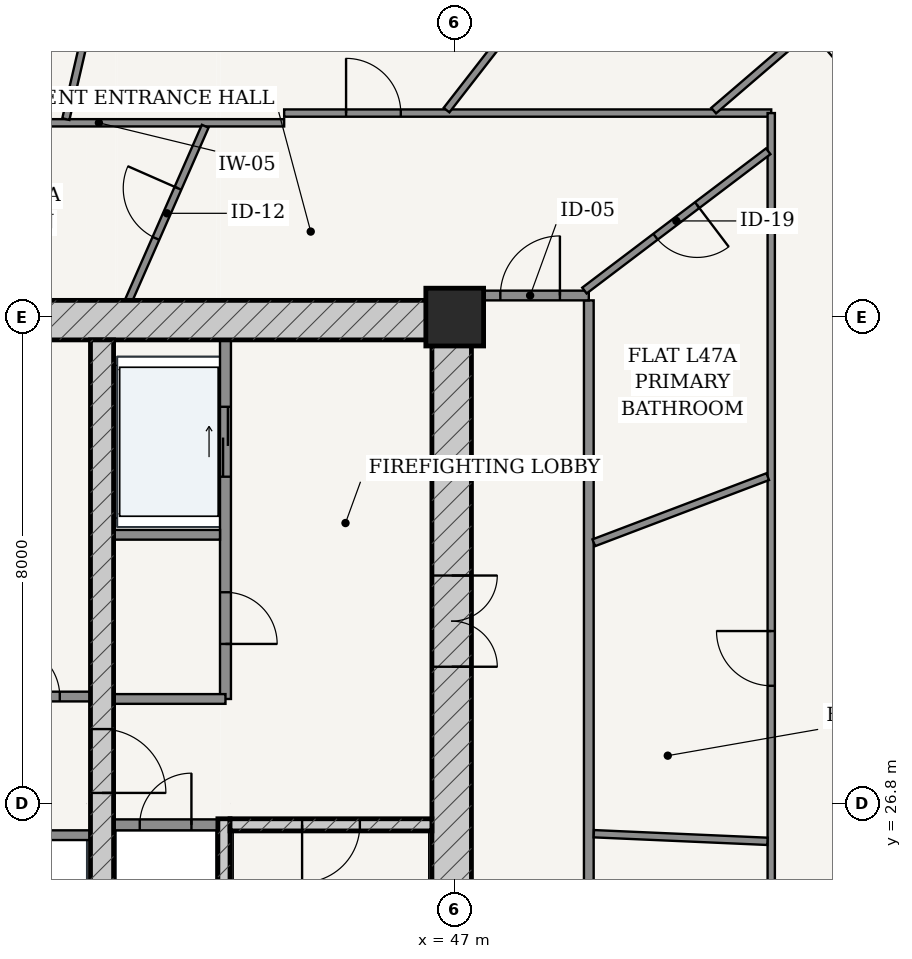
"""IFC4 building model, lengths in metres.
Left out: names, types, materials, properties, quantities, classifications, styles, units other than length and angle.
Written with IfcOpenShell. Run it as: python <this file> out.ifc"""

import sys

from ifc_helpers import new_model, si_unit, direction, frame, frame_2d, origin, origin_2d, place, context, subcontext, project, spatial, rectangle, extrude, source, transform, mapped, element, fill, save


model = new_model("IFC4")
c1 = context("Model", 3, precision=1e-05, world=origin(), true_north=direction((-0.2419218956, 0.970295726276)))
c2 = subcontext(c1, "Body", "Model", "MODEL_VIEW")
j1 = project(units=[si_unit("LENGTHUNIT", "METRE"), si_unit("PLANEANGLEUNIT", "RADIAN")], contexts=[c1])
p1 = place(None, origin())
s1 = spatial("IfcSite", under=j1, at=p1, CompositionType="ELEMENT")
p2 = place(p1, origin())
s2 = spatial("IfcBuilding", under=s1, at=p2, CompositionType="ELEMENT")
p3 = place(p2, frame((0.0, 0.0, 178.6)))
s3 = spatial("IfcBuildingStorey", under=s2, at=p3, CompositionType="ELEMENT", Elevation=178.6)
p4 = place(p3, frame((47.0, 34.8, 0.0), z_axis=(0.0, 0.0, 1.0), x_axis=(1.0, 0.0, 0.0)))
e1 = element("IfcColumn", 1, at=p4, inside=s3, PredefinedType="COLUMN", context=c2, shape_type="SweptSolid", body=[
    extrude(rectangle(XDim=0.95, YDim=0.95, at=origin_2d()), origin(), (0.0, 0.0, 1.0), 3.6),
])
p5 = place(p3, frame((28.725, 34.75, 0.0), z_axis=(0.0, 0.0, 1.0), x_axis=(1.0, 0.0, 0.0)))
e2 = element("IfcWall", 2, at=p5, inside=s3, PredefinedType="SHEAR", context=c2, shape_type="SweptSolid", body=[
    extrude(rectangle(XDim=18.55, YDim=0.65, at=frame_2d((9.275, 0.0))), origin(), (0.0, 0.0, 1.0), 3.33),
])
p6 = place(p3, frame((46.95, 19.175, 0.0), z_axis=(0.0, 0.0, 1.0), x_axis=(0.0, 1.0, 0.0)))
e3 = element("IfcWall", 3, at=p6, inside=s3, PredefinedType="SHEAR", context=c2, shape_type="SweptSolid", body=[
    extrude(rectangle(XDim=15.25, YDim=0.65, at=frame_2d((7.625, 0.0))), origin(), (0.0, 0.0, 1.0), 3.33),
])
p7 = place(p6, frame((9.875, 0.0, 0.0)))
e4 = element("IfcOpeningElement", 4, at=p7, cuts=e3, PredefinedType="OPENING", context=c2, shape_type="SweptSolid", body=[
    extrude(rectangle(XDim=1.5, YDim=2.2, at=frame_2d((0.75, 1.1))), frame((0.0, 0.335, 0.0), z_axis=(0.0, -1.0, 0.0), x_axis=(1.0, 0.0, 0.0)), (0.0, 0.0, 1.0), 0.67),
])
p8 = place(p3, frame((43.205, 19.175, 0.0), z_axis=(0.0, 0.0, 1.0), x_axis=(0.0, 1.0, 0.0)))
e5 = element("IfcWall", 5, at=p8, inside=s3, PredefinedType="SOLIDWALL", context=c2, shape_type="SweptSolid", body=[
    extrude(rectangle(XDim=7.375, YDim=0.2, at=frame_2d((3.688, 0.0))), origin(), (0.0, 0.0, 1.0), 3.33),
])
p9 = place(p3, frame((43.305, 26.45, 0.0), z_axis=(0.0, 0.0, 1.0), x_axis=(1.0, 0.0, 0.0)))
e6 = element("IfcWall", 6, at=p9, inside=s3, PredefinedType="SOLIDWALL", context=c2, shape_type="SweptSolid", body=[
    extrude(rectangle(XDim=3.32, YDim=0.2, at=frame_2d((1.66, 0.0))), origin(), (0.0, 0.0, 1.0), 3.33),
])
p10 = place(p9, frame((1.185, 0.0, 0.0)))
e7 = element("IfcOpeningElement", 7, at=p10, cuts=e6, PredefinedType="OPENING", context=c2, shape_type="SweptSolid", body=[
    extrude(rectangle(XDim=0.95, YDim=2.15, at=frame_2d((0.475, 1.075))), frame((0.0, 0.11, 0.0), z_axis=(0.0, -1.0, 0.0), x_axis=(1.0, 0.0, 0.0)), (0.0, 0.0, 1.0), 0.22),
])
p11 = place(p3, frame((41.2, 19.175, 0.0), z_axis=(0.0, 0.0, 1.0), x_axis=(0.0, 1.0, 0.0)))
e8 = element("IfcWall", 8, at=p11, inside=s3, PredefinedType="SHEAR", context=c2, shape_type="SweptSolid", body=[
    extrude(rectangle(XDim=15.25, YDim=0.38, at=frame_2d((7.625, 0.0))), origin(), (0.0, 0.0, 1.0), 3.33),
])
p12 = place(p11, frame((7.8, 0.0, 0.0)))
e9 = element("IfcOpeningElement", 9, at=p12, cuts=e8, PredefinedType="OPENING", context=c2, shape_type="SweptSolid", body=[
    extrude(rectangle(XDim=1.05, YDim=2.15, at=frame_2d((0.525, 1.075))), frame((0.0, 0.2, 0.0), z_axis=(0.0, -1.0, 0.0), x_axis=(1.0, 0.0, 0.0)), (0.0, 0.0, 1.0), 0.4),
])
p13 = place(p3, frame((41.39, 26.45, 0.0), z_axis=(0.0, 0.0, 1.0), x_axis=(1.0, 0.0, 0.0)))
e10 = element("IfcWall", 10, at=p13, inside=s3, PredefinedType="PARTITIONING", context=c2, shape_type="SweptSolid", body=[
    extrude(rectangle(XDim=1.71, YDim=0.18, at=frame_2d((0.855, 0.0))), origin(), (0.0, 0.0, 1.0), 3.33),
])
p14 = place(p13, frame((0.43, 0.0, 0.0)))
e11 = element("IfcOpeningElement", 11, at=p14, cuts=e10, PredefinedType="OPENING", context=c2, shape_type="SweptSolid", body=[
    extrude(rectangle(XDim=0.85, YDim=2.1, at=frame_2d((0.425, 1.05))), frame((0.0, 0.1, 0.0), z_axis=(0.0, -1.0, 0.0), x_axis=(1.0, 0.0, 0.0)), (0.0, 0.0, 1.0), 0.2),
])
p15 = place(p3, frame((43.23, 28.52, 0.0), z_axis=(0.0, 0.0, 1.0), x_axis=(0.0, 1.0, 0.0)))
e12 = element("IfcWall", 12, at=p15, inside=s3, PredefinedType="PARTITIONING", context=c2, shape_type="SweptSolid", body=[
    extrude(rectangle(XDim=5.905, YDim=0.18, at=frame_2d((2.953, 0.0))), origin(), (0.0, 0.0, 1.0), 3.33),
])
p16 = place(p15, frame((0.905, 0.0, 0.0)))
e13 = element("IfcOpeningElement", 13, at=p16, cuts=e12, PredefinedType="OPENING", context=c2, shape_type="SweptSolid", body=[
    extrude(rectangle(XDim=0.85, YDim=2.1, at=frame_2d((0.425, 1.05))), frame((0.0, 0.1, 0.0), z_axis=(0.0, -1.0, 0.0), x_axis=(1.0, 0.0, 0.0)), (0.0, 0.0, 1.0), 0.2),
])
p17 = place(p15, frame((3.655, 0.0, 0.0)))
e14 = element("IfcOpeningElement", 14, at=p17, cuts=e12, PredefinedType="OPENING", context=c2, shape_type="SweptSolid", body=[
    extrude(rectangle(XDim=1.15, YDim=2.2, at=frame_2d((0.575, 1.1))), frame((0.0, 0.1, 0.0), z_axis=(0.0, -1.0, 0.0), x_axis=(1.0, 0.0, 0.0)), (0.0, 0.0, 1.0), 0.2),
])
p18 = place(p3, frame((41.39, 31.22, 0.0), z_axis=(0.0, 0.0, 1.0), x_axis=(1.0, 0.0, 0.0)))
e15 = element("IfcWall", 15, at=p18, inside=s3, PredefinedType="PARTITIONING", context=c2, shape_type="SweptSolid", body=[
    extrude(rectangle(XDim=1.75, YDim=0.16, at=frame_2d((0.875, 0.0))), origin(), (0.0, 0.0, 1.0), 3.33),
])
p19 = place(p3, frame((41.39, 28.52, 0.0), z_axis=(0.0, 0.0, 1.0), x_axis=(1.0, 0.0, 0.0)))
e16 = element("IfcWall", 16, at=p19, inside=s3, PredefinedType="PARTITIONING", context=c2, shape_type="SweptSolid", body=[
    extrude(rectangle(XDim=1.84, YDim=0.16, at=frame_2d((0.92, 0.0))), origin(), (0.0, 0.0, 1.0), 3.33),
])
p20 = place(p3, frame((34.99, 28.56, 0.0), z_axis=(0.0, 0.0, 1.0), x_axis=(1.0, 0.0, 0.0)))
e17 = element("IfcWall", 17, at=p20, inside=s3, PredefinedType="PARTITIONING", context=c2, shape_type="SweptSolid", body=[
    extrude(rectangle(XDim=6.02, YDim=0.16, at=frame_2d((3.01, 0.0))), origin(), (0.0, 0.0, 1.0), 3.33),
])
p21 = place(p20, frame((0.505, 0.0, 0.0)))
e18 = element("IfcOpeningElement", 18, at=p21, cuts=e17, PredefinedType="OPENING", context=c2, shape_type="SweptSolid", body=[
    extrude(rectangle(XDim=0.85, YDim=2.1, at=frame_2d((0.425, 1.05))), frame((0.0, 0.09, 0.0), z_axis=(0.0, -1.0, 0.0), x_axis=(1.0, 0.0, 0.0)), (0.0, 0.0, 1.0), 0.18),
])
p22 = place(p20, frame((2.58, 0.0, 0.0)))
e19 = element("IfcOpeningElement", 19, at=p22, cuts=e17, PredefinedType="OPENING", context=c2, shape_type="SweptSolid", body=[
    extrude(rectangle(XDim=0.86, YDim=2.1, at=frame_2d((0.43, 1.05))), frame((0.0, 0.09, 0.0), z_axis=(0.0, -1.0, 0.0), x_axis=(1.0, 0.0, 0.0)), (0.0, 0.0, 1.0), 0.18),
])
p23 = place(p20, frame((4.665, 0.0, 0.0)))
e20 = element("IfcOpeningElement", 20, at=p23, cuts=e17, PredefinedType="OPENING", context=c2, shape_type="SweptSolid", body=[
    extrude(rectangle(XDim=0.85, YDim=2.1, at=frame_2d((0.425, 1.05))), frame((0.0, 0.09, 0.0), z_axis=(0.0, -1.0, 0.0), x_axis=(1.0, 0.0, 0.0)), (0.0, 0.0, 1.0), 0.18),
])
p24 = place(p3, frame((34.99, 26.28, 0.0), z_axis=(0.0, 0.0, 1.0), x_axis=(1.0, 0.0, 0.0)))
e21 = element("IfcWall", 21, at=p24, inside=s3, PredefinedType="PARTITIONING", context=c2, shape_type="SweptSolid", body=[
    extrude(rectangle(XDim=6.02, YDim=0.16, at=frame_2d((3.01, 0.0))), origin(), (0.0, 0.0, 1.0), 3.33),
])
p25 = place(p24, frame((0.225, 0.0, 0.0)))
e22 = element("IfcOpeningElement", 22, at=p25, cuts=e21, PredefinedType="OPENING", context=c2, shape_type="SweptSolid", body=[
    extrude(rectangle(XDim=1.1, YDim=2.2, at=frame_2d((0.55, 1.1))), frame((0.0, 0.09, 0.0), z_axis=(0.0, -1.0, 0.0), x_axis=(1.0, 0.0, 0.0)), (0.0, 0.0, 1.0), 0.18),
])
p26 = place(p24, frame((1.705, 0.0, 0.0)))
e23 = element("IfcOpeningElement", 23, at=p26, cuts=e21, PredefinedType="OPENING", context=c2, shape_type="SweptSolid", body=[
    extrude(rectangle(XDim=1.1, YDim=2.2, at=frame_2d((0.55, 1.1))), frame((0.0, 0.09, 0.0), z_axis=(0.0, -1.0, 0.0), x_axis=(1.0, 0.0, 0.0)), (0.0, 0.0, 1.0), 0.18),
])
p27 = place(p3, frame((49.205, 16.675, 0.0), z_axis=(0.0, 0.0, 1.0), x_axis=(0.0, 1.0, 0.0)))
e24 = element("IfcWall", 24, at=p27, inside=s3, PredefinedType="PARTITIONING", context=c2, shape_type="SweptSolid", body=[
    extrude(rectangle(XDim=18.4, YDim=0.16, at=frame_2d((9.2, 0.0))), origin(), (0.0, 0.0, 1.0), 2.776),
])
p28 = place(p3, frame((47.275, 35.155, 0.0), z_axis=(0.0, 0.0, 1.0), x_axis=(1.0, 0.0, 0.0)))
e25 = element("IfcWall", 25, at=p28, inside=s3, PredefinedType="PARTITIONING", context=c2, shape_type="SweptSolid", body=[
    extrude(rectangle(XDim=1.93, YDim=0.16, at=frame_2d((0.965, 0.0))), origin(), (0.0, 0.0, 1.0), 2.776),
])
p29 = place(p28, frame((0.475, 0.0, 0.0)))
e26 = element("IfcOpeningElement", 26, at=p29, cuts=e25, PredefinedType="OPENING", context=c2, shape_type="SweptSolid", body=[
    extrude(rectangle(XDim=0.98, YDim=2.2, at=frame_2d((0.49, 1.1))), frame((0.0, 0.09, 0.0), z_axis=(0.0, -1.0, 0.0), x_axis=(1.0, 0.0, 0.0)), (0.0, 0.0, 1.0), 0.18),
])
p30 = place(p3, frame((38.102, 37.995, 0.0), z_axis=(0.0, 0.0, 1.0), x_axis=(1.0, 0.0, 0.0)))
e27 = element("IfcWall", 27, at=p30, inside=s3, PredefinedType="PARTITIONING", context=c2, shape_type="SweptSolid", body=[
    extrude(rectangle(XDim=6.093, YDim=0.12, at=frame_2d((3.046, 0.0))), origin(), (0.0, 0.0, 1.0), 2.776),
])
p31 = place(p3, frame((44.195, 38.155, 0.0), z_axis=(0.0, 0.0, 1.0), x_axis=(1.0, 0.0, 0.0)))
e28 = element("IfcWall", 28, at=p31, inside=s3, PredefinedType="PARTITIONING", context=c2, shape_type="SweptSolid", body=[
    extrude(rectangle(XDim=8.01, YDim=0.12, at=frame_2d((4.005, 0.0))), origin(), (0.0, 0.0, 1.0), 2.776),
])
p32 = place(p31, frame((1.018, 0.0, 0.0)))
e29 = element("IfcOpeningElement", 29, at=p32, cuts=e28, PredefinedType="OPENING", context=c2, shape_type="SweptSolid", body=[
    extrude(rectangle(XDim=0.9, YDim=2.15, at=frame_2d((0.45, 1.075))), frame((0.0, 0.07, 0.0), z_axis=(0.0, -1.0, 0.0), x_axis=(1.0, 0.0, 0.0)), (0.0, 0.0, 1.0), 0.14),
])
p33 = place(p3, frame((52.205, 38.155, 0.0), z_axis=(0.0, 0.0, 1.0), x_axis=(0.0, -1.0, 0.0)))
e30 = element("IfcWall", 30, at=p33, inside=s3, PredefinedType="PARTITIONING", context=c2, shape_type="SweptSolid", body=[
    extrude(rectangle(XDim=16.31, YDim=0.12, at=frame_2d((8.155, 0.0))), origin(), (0.0, 0.0, 1.0), 2.776),
])
p34 = place(p33, frame((13.574, 0.0, 0.0)))
e31 = element("IfcOpeningElement", 31, at=p34, cuts=e30, PredefinedType="OPENING", context=c2, shape_type="SweptSolid", body=[
    extrude(rectangle(XDim=0.9, YDim=2.15, at=frame_2d((0.45, 1.075))), frame((0.0, 0.07, 0.0), z_axis=(0.0, -1.0, 0.0), x_axis=(1.0, 0.0, 0.0)), (0.0, 0.0, 1.0), 0.14),
])
p35 = place(p33, frame((8.518, 0.0, 0.0)))
e32 = element("IfcOpeningElement", 32, at=p35, cuts=e30, PredefinedType="OPENING", context=c2, shape_type="SweptSolid", body=[
    extrude(rectangle(XDim=0.9, YDim=2.15, at=frame_2d((0.45, 1.075))), frame((0.0, 0.07, 0.0), z_axis=(0.0, -1.0, 0.0), x_axis=(1.0, 0.0, 0.0)), (0.0, 0.0, 1.0), 0.14),
])
p36 = place(p3, frame((51.258, 38.195, 0.0), z_axis=(0.0, 0.0, 1.0), x_axis=(0.758369880373, 0.651824458381, 0.0)))
e33 = element("IfcWall", 33, at=p36, inside=s3, PredefinedType="PARTITIONING", context=c2, shape_type="SweptSolid", body=[
    extrude(rectangle(XDim=5.018, YDim=0.12, at=frame_2d((2.509, 0.0))), origin(), (0.0, 0.0, 1.0), 2.846),
])
p37 = place(p36, frame((2.059, 0.0, 0.0)))
e34 = element("IfcOpeningElement", 34, at=p37, cuts=e33, PredefinedType="OPENING", context=c2, shape_type="SweptSolid", body=[
    extrude(rectangle(XDim=0.9, YDim=2.15, at=frame_2d((0.45, 1.075))), frame((0.0, 0.07, 0.0), z_axis=(0.0, -1.0, 0.0), x_axis=(1.0, 0.0, 0.0)), (0.0, 0.0, 1.0), 0.14),
])
p38 = place(p3, frame((46.865, 38.204, 0.0), z_axis=(0.0, 0.0, 1.0), x_axis=(0.613754405153, 0.789497010859, 0.0)))
e35 = element("IfcWall", 35, at=p38, inside=s3, PredefinedType="PARTITIONING", context=c2, shape_type="SweptSolid", body=[
    extrude(rectangle(XDim=7.353, YDim=0.12, at=frame_2d((3.677, 0.0))), origin(), (0.0, 0.0, 1.0), 2.776),
])
p39 = place(p38, frame((2.224, 0.0, 0.0)))
e36 = element("IfcOpeningElement", 36, at=p39, cuts=e35, PredefinedType="OPENING", context=c2, shape_type="SweptSolid", body=[
    extrude(rectangle(XDim=0.9, YDim=2.15, at=frame_2d((0.45, 1.075))), frame((0.0, 0.07, 0.0), z_axis=(0.0, -1.0, 0.0), x_axis=(1.0, 0.0, 0.0)), (0.0, 0.0, 1.0), 0.14),
])
p40 = place(p3, frame((40.605, 38.055, 0.0), z_axis=(0.0, 0.0, 1.0), x_axis=(0.225466493239, 0.974250922723, 0.0)))
e37 = element("IfcWall", 37, at=p40, inside=s3, PredefinedType="PARTITIONING", context=c2, shape_type="SweptSolid", body=[
    extrude(rectangle(XDim=9.282, YDim=0.12, at=frame_2d((4.641, 0.0))), origin(), (0.0, 0.0, 1.0), 2.776),
])
p41 = place(p40, frame((3.182, 0.0, 0.0)))
e38 = element("IfcOpeningElement", 38, at=p41, cuts=e37, PredefinedType="OPENING", context=c2, shape_type="SweptSolid", body=[
    extrude(rectangle(XDim=0.9, YDim=2.15, at=frame_2d((0.45, 1.075))), frame((0.0, 0.07, 0.0), z_axis=(0.0, -1.0, 0.0), x_axis=(1.0, 0.0, 0.0)), (0.0, 0.0, 1.0), 0.14),
])
p42 = place(p3, frame((49.287, 26.304, 0.0), z_axis=(0.0, 0.0, 1.0), x_axis=(0.999039813392, -0.043811542509, 0.0)))
e39 = element("IfcWall", 39, at=p42, inside=s3, PredefinedType="PARTITIONING", context=c2, shape_type="SweptSolid", body=[
    extrude(rectangle(XDim=2.859, YDim=0.12, at=frame_2d((1.429, 0.0))), origin(), (0.0, 0.0, 1.0), 3.33),
])
p43 = place(p3, frame((49.287, 31.089, 0.0), z_axis=(0.0, 0.0, 1.0), x_axis=(0.934802126635, 0.3551689514, 0.0)))
e40 = element("IfcWall", 40, at=p43, inside=s3, PredefinedType="PARTITIONING", context=c2, shape_type="SweptSolid", body=[
    extrude(rectangle(XDim=3.06, YDim=0.12, at=frame_2d((1.53, 0.0))), origin(), (0.0, 0.0, 1.0), 3.33),
])
p44 = place(p3, frame((49.133, 35.236, 0.0), z_axis=(0.0, 0.0, 1.0), x_axis=(0.797054583929, 0.603907269568, 0.0)))
e41 = element("IfcWall", 41, at=p44, inside=s3, PredefinedType="PARTITIONING", context=c2, shape_type="SweptSolid", body=[
    extrude(rectangle(XDim=3.792, YDim=0.12, at=frame_2d((1.896, 0.0))), origin(), (0.0, 0.0, 1.0), 3.005),
])
p45 = place(p44, frame((1.466, 0.0, 0.0)))
e42 = element("IfcOpeningElement", 42, at=p45, cuts=e41, PredefinedType="OPENING", context=c2, shape_type="SweptSolid", body=[
    extrude(rectangle(XDim=0.86, YDim=2.15, at=frame_2d((0.43, 1.075))), frame((0.0, 0.07, 0.0), z_axis=(0.0, -1.0, 0.0), x_axis=(1.0, 0.0, 0.0)), (0.0, 0.0, 1.0), 0.14),
])
p46 = place(p3, frame((41.638, 35.075, 0.0), z_axis=(0.0, 0.0, 1.0), x_axis=(0.402456087228, 0.915439292282, 0.0)))
e43 = element("IfcWall", 43, at=p46, inside=s3, PredefinedType="PARTITIONING", context=c2, shape_type="SweptSolid", body=[
    extrude(rectangle(XDim=3.128, YDim=0.12, at=frame_2d((1.564, 0.0))), origin(), (0.0, 0.0, 1.0), 3.33),
])
p47 = place(p46, frame((1.114, 0.0, 0.0)))
e44 = element("IfcOpeningElement", 44, at=p47, cuts=e43, PredefinedType="OPENING", context=c2, shape_type="SweptSolid", body=[
    extrude(rectangle(XDim=0.9, YDim=2.15, at=frame_2d((0.45, 1.075))), frame((0.0, 0.07, 0.0), z_axis=(0.0, -1.0, 0.0), x_axis=(1.0, 0.0, 0.0)), (0.0, 0.0, 1.0), 0.14),
])
m1 = source(origin(), c2, "Body", "SweptSolid", [
    extrude(rectangle(XDim=1.5, YDim=2.2, at=frame_2d((0.75, 1.1))), frame((0.0, 0.025, 0.0), z_axis=(0.0, -1.0, 0.0), x_axis=(1.0, 0.0, 0.0)), (0.0, 0.0, 1.0), 0.05),
])
p48 = place(p7, frame((1.5, 0.0, 0.0), z_axis=(0.0, 0.0, 1.0), x_axis=(-1.0, 0.0, 0.0)))
e45 = element("IfcDoor", 45, at=p48, inside=s3, OperationType="DOUBLE_DOOR_SINGLE_SWING", PredefinedType="DOOR", context=c2, shape_type="MappedRepresentation", body=[
    mapped(m1, transform((0.0, 0.0, 0.0), scale=1.0)),
])
fill(e4, e45)
m2 = source(origin(), c2, "Body", "SweptSolid", [
    extrude(rectangle(XDim=1.05, YDim=2.15, at=frame_2d((0.525, 1.075))), frame((0.0, 0.025, 0.0), z_axis=(0.0, -1.0, 0.0), x_axis=(1.0, 0.0, 0.0)), (0.0, 0.0, 1.0), 0.05),
])
p49 = place(p12, frame((1.05, 0.0, 0.0), z_axis=(0.0, 0.0, 1.0), x_axis=(-1.0, 0.0, 0.0)))
e46 = element("IfcDoor", 46, at=p49, inside=s3, OperationType="SINGLE_SWING_RIGHT", PredefinedType="DOOR", context=c2, shape_type="MappedRepresentation", body=[
    mapped(m2, transform((0.0, 0.0, 0.0), scale=1.0)),
])
fill(e9, e46)
m3 = source(origin(), c2, "Body", "SweptSolid", [
    extrude(rectangle(XDim=0.95, YDim=2.15, at=frame_2d((0.475, 1.075))), frame((0.0, 0.025, 0.0), z_axis=(0.0, -1.0, 0.0), x_axis=(1.0, 0.0, 0.0)), (0.0, 0.0, 1.0), 0.05),
])
p50 = place(p10, frame((0.95, 0.0, 0.0), z_axis=(0.0, 0.0, 1.0), x_axis=(-1.0, 0.0, 0.0)))
e47 = element("IfcDoor", 47, at=p50, inside=s3, OperationType="SINGLE_SWING_RIGHT", PredefinedType="DOOR", context=c2, shape_type="MappedRepresentation", body=[
    mapped(m3, transform((0.0, 0.0, 0.0), scale=1.0)),
])
fill(e7, e47)
m4 = source(origin(), c2, "Body", "SweptSolid", [
    extrude(rectangle(XDim=0.85, YDim=2.1, at=frame_2d((0.425, 1.05))), frame((0.0, 0.025, 0.0), z_axis=(0.0, -1.0, 0.0), x_axis=(1.0, 0.0, 0.0)), (0.0, 0.0, 1.0), 0.05),
])
p51 = place(p14, origin())
e48 = element("IfcDoor", 48, at=p51, inside=s3, OperationType="SINGLE_SWING_RIGHT", PredefinedType="DOOR", context=c2, shape_type="MappedRepresentation", body=[
    mapped(m4, transform((0.0, 0.0, 0.0), scale=1.0)),
])
fill(e11, e48)
p52 = place(p16, frame((0.85, 0.0, 0.0), z_axis=(0.0, 0.0, 1.0), x_axis=(-1.0, 0.0, 0.0)))
e49 = element("IfcDoor", 49, at=p52, inside=s3, OperationType="SINGLE_SWING_RIGHT", PredefinedType="DOOR", context=c2, shape_type="MappedRepresentation", body=[
    mapped(m4, transform((0.0, 0.0, 0.0), scale=1.0)),
])
fill(e13, e49)
p53 = place(p23, origin())
e50 = element("IfcDoor", 50, at=p53, inside=s3, OperationType="SINGLE_SWING_LEFT", PredefinedType="DOOR", context=c2, shape_type="MappedRepresentation", body=[
    mapped(m4, transform((0.0, 0.0, 0.0), scale=1.0)),
])
fill(e20, e50)
m5 = source(origin(), c2, "Body", "SweptSolid", [
    extrude(rectangle(XDim=1.15, YDim=2.2, at=frame_2d((0.575, 1.1))), frame((0.0, 0.025, 0.0), z_axis=(0.0, -1.0, 0.0), x_axis=(1.0, 0.0, 0.0)), (0.0, 0.0, 1.0), 0.05),
])
p54 = place(p17, origin())
e51 = element("IfcDoor", 51, at=p54, inside=s3, OperationType="DOUBLE_DOOR_SLIDING", PredefinedType="DOOR", context=c2, shape_type="MappedRepresentation", body=[
    mapped(m5, transform((0.0, 0.0, 0.0), scale=1.0)),
])
fill(e14, e51)
m6 = source(origin(), c2, "Body", "SweptSolid", [
    extrude(rectangle(XDim=0.98, YDim=2.2, at=frame_2d((0.49, 1.1))), frame((0.0, 0.025, 0.0), z_axis=(0.0, -1.0, 0.0), x_axis=(1.0, 0.0, 0.0)), (0.0, 0.0, 1.0), 0.05),
])
p55 = place(p29, origin())
e52 = element("IfcDoor", 52, at=p55, inside=s3, OperationType="SINGLE_SWING_RIGHT", PredefinedType="DOOR", context=c2, shape_type="MappedRepresentation", body=[
    mapped(m6, transform((0.0, 0.0, 0.0), scale=1.0)),
])
fill(e26, e52)
m7 = source(origin(), c2, "Body", "SweptSolid", [
    extrude(rectangle(XDim=0.86, YDim=2.15, at=frame_2d((0.43, 1.075))), frame((0.0, 0.025, 0.0), z_axis=(0.0, -1.0, 0.0), x_axis=(1.0, 0.0, 0.0)), (0.0, 0.0, 1.0), 0.05),
])
p56 = place(p45, frame((0.86, 0.0, 0.0), z_axis=(0.0, 0.0, 1.0), x_axis=(-1.0, 0.0, 0.0)))
e53 = element("IfcDoor", 53, at=p56, inside=s3, OperationType="SINGLE_SWING_LEFT", PredefinedType="DOOR", context=c2, shape_type="MappedRepresentation", body=[
    mapped(m7, transform((0.0, 0.0, 0.0), scale=1.0)),
])
fill(e42, e53)
m8 = source(origin(), c2, "Body", "SweptSolid", [
    extrude(rectangle(XDim=0.9, YDim=2.15, at=frame_2d((0.45, 1.075))), frame((0.0, 0.025, 0.0), z_axis=(0.0, -1.0, 0.0), x_axis=(1.0, 0.0, 0.0)), (0.0, 0.0, 1.0), 0.05),
])
p57 = place(p47, origin())
e54 = element("IfcDoor", 54, at=p57, inside=s3, OperationType="SINGLE_SWING_RIGHT", PredefinedType="DOOR", context=c2, shape_type="MappedRepresentation", body=[
    mapped(m8, transform((0.0, 0.0, 0.0), scale=1.0)),
])
fill(e44, e54)
p58 = place(p32, origin())
e55 = element("IfcDoor", 55, at=p58, inside=s3, OperationType="SINGLE_SWING_LEFT", PredefinedType="DOOR", context=c2, shape_type="MappedRepresentation", body=[
    mapped(m8, transform((0.0, 0.0, 0.0), scale=1.0)),
])
fill(e29, e55)
p59 = place(p35, frame((0.9, 0.0, 0.0), z_axis=(0.0, 0.0, 1.0), x_axis=(-1.0, 0.0, 0.0)))
e56 = element("IfcDoor", 56, at=p59, inside=s3, OperationType="SINGLE_SWING_RIGHT", PredefinedType="DOOR", context=c2, shape_type="MappedRepresentation", body=[
    mapped(m8, transform((0.0, 0.0, 0.0), scale=1.0)),
])
fill(e32, e56)
save(model, sys.argv[1])
